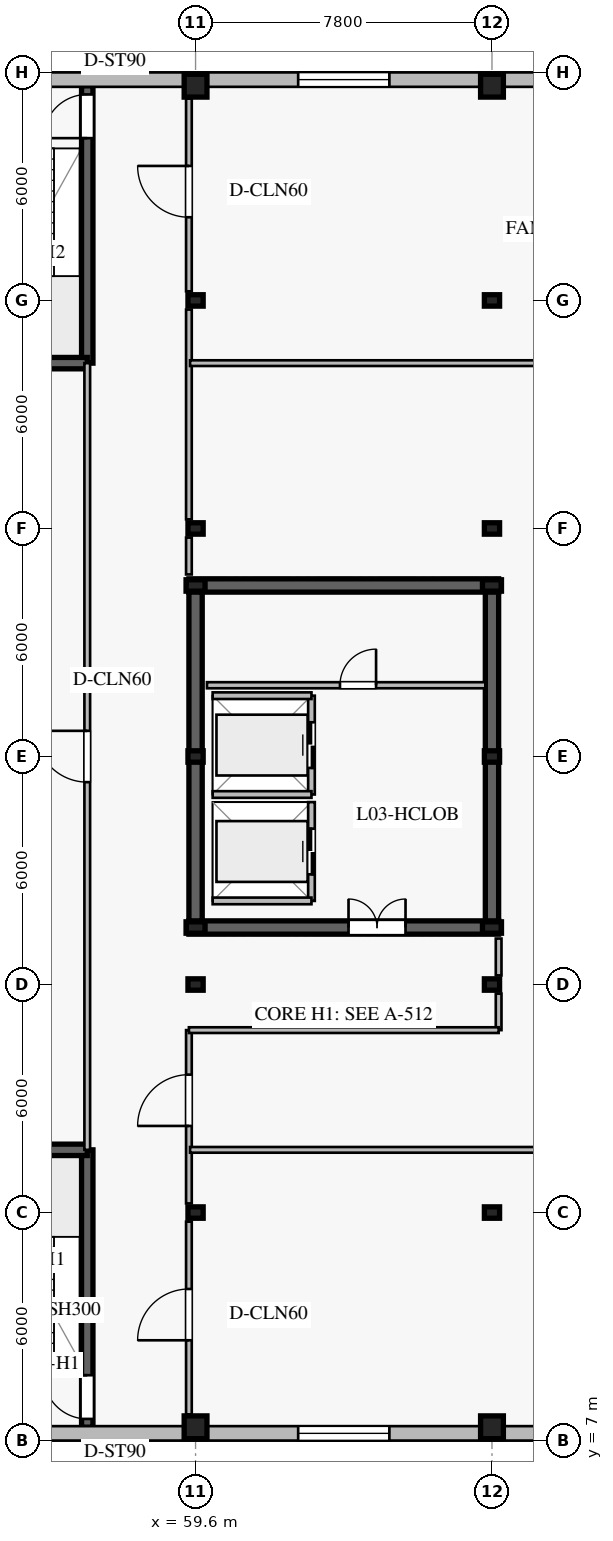
"""IFC4 building model, lengths in metres.
Left out: names, types, materials, properties, quantities, classifications, styles, units other than length and angle.
Written with IfcOpenShell. Run it as: python <this file> out.ifc"""

import sys

from ifc_helpers import new_model, si_unit, direction, frame, frame_2d, origin, origin_2d, place, context, subcontext, project, spatial, rectangle, i_section, extrude, element, fill, save


model = new_model("IFC4")
c1 = context("Model", 3, precision=1e-05, world=origin(), true_north=direction((0.0, 1.0)))
c2 = subcontext(c1, "Body", "Model", "MODEL_VIEW")
j1 = project(units=[si_unit("LENGTHUNIT", "METRE"), si_unit("PLANEANGLEUNIT", "RADIAN")], contexts=[c1])
p1 = place(None, origin())
s1 = spatial("IfcSite", under=j1, at=p1, CompositionType="ELEMENT")
p2 = place(p1, origin())
s2 = spatial("IfcBuilding", under=s1, at=p2, CompositionType="ELEMENT")
p3 = place(p2, frame((0.0, 0.0, 14.4)))
s3 = spatial("IfcBuildingStorey", under=s2, at=p3, CompositionType="ELEMENT", Elevation=14.4)
p4 = place(p3, frame((59.425, 20.5, 0.0), z_axis=(0.0, 0.0, 1.0), x_axis=(1.0, 0.0, 0.0)))
e1 = element("IfcWall", 1, at=p4, inside=s3, PredefinedType="SHEAR", context=c2, shape_type="SweptSolid", body=[
    extrude(rectangle(XDim=8.15, YDim=0.35, at=frame_2d((4.075, 0.0))), origin(), (0.0, 0.0, 1.0), 4.3),
])
p5 = place(p4, frame((4.2, 0.0, 0.0)))
e2 = element("IfcOpeningElement", 2, at=p5, cuts=e1, PredefinedType="OPENING", context=c2, shape_type="SweptSolid", body=[
    extrude(rectangle(XDim=1.5, YDim=2.2, at=frame_2d((0.75, 1.1))), frame((0.0, 0.185, 0.0), z_axis=(0.0, -1.0, 0.0), x_axis=(1.0, 0.0, 0.0)), (0.0, 0.0, 1.0), 0.37),
])
p6 = place(p3, frame((67.575, 29.5, 0.0), z_axis=(0.0, 0.0, 1.0), x_axis=(-1.0, 0.0, 0.0)))
e3 = element("IfcWall", 3, at=p6, inside=s3, PredefinedType="SHEAR", context=c2, shape_type="SweptSolid", body=[
    extrude(rectangle(XDim=8.15, YDim=0.35, at=frame_2d((4.075, 0.0))), origin(), (0.0, 0.0, 1.0), 4.3),
])
for number, where, z_axis, x_axis in (
    (4, (59.6, 29.325, 0.0), (0.0, 0.0, 1.0), (0.0, -1.0, 0.0)),
    (5, (67.4, 20.675, 0.0), (0.0, 0.0, 1.0), (0.0, 1.0, 0.0)),
):
    element("IfcWall", number, at=place(p3, frame(where, z_axis=z_axis, x_axis=x_axis)), inside=s3, PredefinedType="SHEAR", context=c2, shape_type="SweptSolid", body=[
        extrude(rectangle(XDim=8.65, YDim=0.35, at=frame_2d((4.325, 0.0))), origin(), (0.0, 0.0, 1.0), 4.3),
    ])
for number, where, z_axis, x_axis in (
    (6, (59.6, 20.5, 0.0), (0.0, 0.0, 1.0), (1.0, 0.0, 0.0)),
    (7, (67.4, 20.5, 0.0), (0.0, 0.0, 1.0), (1.0, 0.0, 0.0)),
    (8, (67.4, 29.5, 0.0), (0.0, 0.0, 1.0), (1.0, 0.0, 0.0)),
    (9, (59.6, 29.5, 0.0), (0.0, 0.0, 1.0), (1.0, 0.0, 0.0)),
):
    element("IfcColumn", number, at=place(p3, frame(where, z_axis=z_axis, x_axis=x_axis)), inside=s3, PredefinedType="COLUMN", context=c2, shape_type="SweptSolid", body=[
        extrude(i_section(OverallWidth=0.3, OverallDepth=0.5, WebThickness=0.014, FlangeThickness=0.028, at=origin_2d()), origin(), (0.0, 0.0, 1.0), 4.6),
    ])
p7 = place(p3, frame((56.75, 7.35, 0.0), z_axis=(0.0, 0.0, 1.0), x_axis=(0.0, 1.0, 0.0)))
e10 = element("IfcWall", 10, at=p7, inside=s3, PredefinedType="SOLIDWALL", context=c2, shape_type="SweptSolid", body=[
    extrude(rectangle(XDim=7.3, YDim=0.3, at=frame_2d((3.65, 0.0))), origin(), (0.0, 0.0, 1.0), 4.3),
])
p8 = place(p7, frame((0.22, 0.0, 0.0)))
e11 = element("IfcOpeningElement", 11, at=p8, cuts=e10, PredefinedType="OPENING", context=c2, shape_type="SweptSolid", body=[
    extrude(rectangle(XDim=1.15, YDim=2.2, at=frame_2d((0.575, 1.1))), frame((0.0, 0.16, 0.0), z_axis=(0.0, -1.0, 0.0), x_axis=(1.0, 0.0, 0.0)), (0.0, 0.0, 1.0), 0.32),
])
p9 = place(p3, frame((53.4, 14.65, 0.0), z_axis=(0.0, 0.0, 1.0), x_axis=(1.0, 0.0, 0.0)))
e12 = element("IfcWall", 12, at=p9, inside=s3, PredefinedType="SOLIDWALL", context=c2, shape_type="SweptSolid", body=[
    extrude(rectangle(XDim=3.35, YDim=0.3, at=frame_2d((1.675, 0.0))), origin(), (0.0, 0.0, 1.0), 4.3),
])
p10 = place(p3, frame((56.75, 35.35, 0.0), z_axis=(0.0, 0.0, 1.0), x_axis=(0.0, 1.0, 0.0)))
e13 = element("IfcWall", 13, at=p10, inside=s3, PredefinedType="SOLIDWALL", context=c2, shape_type="SweptSolid", body=[
    extrude(rectangle(XDim=7.3, YDim=0.3, at=frame_2d((3.65, 0.0))), origin(), (0.0, 0.0, 1.0), 4.3),
])
p11 = place(p10, frame((5.92, 0.0, 0.0)))
e14 = element("IfcOpeningElement", 14, at=p11, cuts=e13, PredefinedType="OPENING", context=c2, shape_type="SweptSolid", body=[
    extrude(rectangle(XDim=1.15, YDim=2.2, at=frame_2d((0.575, 1.1))), frame((0.0, 0.16, 0.0), z_axis=(0.0, -1.0, 0.0), x_axis=(1.0, 0.0, 0.0)), (0.0, 0.0, 1.0), 0.32),
])
p12 = place(p3, frame((53.4, 35.35, 0.0), z_axis=(0.0, 0.0, 1.0), x_axis=(1.0, 0.0, 0.0)))
e15 = element("IfcWall", 15, at=p12, inside=s3, PredefinedType="SOLIDWALL", context=c2, shape_type="SweptSolid", body=[
    extrude(rectangle(XDim=3.35, YDim=0.3, at=frame_2d((1.675, 0.0))), origin(), (0.0, 0.0, 1.0), 4.3),
])
p13 = place(p3, frame((59.6, 7.35, 0.0), z_axis=(0.0, 0.0, 1.0), x_axis=(1.0, 0.0, 0.0)))
e16 = element("IfcColumn", 16, at=p13, inside=s3, PredefinedType="COLUMN", context=c2, shape_type="SweptSolid", body=[
    extrude(rectangle(XDim=0.6, YDim=0.6, at=origin_2d()), origin(), (0.0, 0.0, 1.0), 4.6),
])
for number, where, z_axis, x_axis in (
    (17, (59.6, 13.0, 0.0), (0.0, 0.0, 1.0), (1.0, 0.0, 0.0)),
    (18, (59.6, 19.0, 0.0), (0.0, 0.0, 1.0), (1.0, 0.0, 0.0)),
    (19, (59.6, 25.0, 0.0), (0.0, 0.0, 1.0), (1.0, 0.0, 0.0)),
    (20, (59.6, 31.0, 0.0), (0.0, 0.0, 1.0), (1.0, 0.0, 0.0)),
    (21, (59.6, 37.0, 0.0), (0.0, 0.0, 1.0), (1.0, 0.0, 0.0)),
):
    element("IfcColumn", number, at=place(p3, frame(where, z_axis=z_axis, x_axis=x_axis)), inside=s3, PredefinedType="COLUMN", context=c2, shape_type="SweptSolid", body=[
        extrude(i_section(OverallWidth=0.3, OverallDepth=0.4, WebThickness=0.013, FlangeThickness=0.024, at=origin_2d()), origin(), (0.0, 0.0, 1.0), 4.6),
    ])
for number, where, z_axis, x_axis in (
    (22, (59.6, 42.65, 0.0), (0.0, 0.0, 1.0), (1.0, 0.0, 0.0)),
    (23, (67.4, 7.35, 0.0), (0.0, 0.0, 1.0), (1.0, 0.0, 0.0)),
):
    element("IfcColumn", number, at=place(p3, frame(where, z_axis=z_axis, x_axis=x_axis)), inside=s3, PredefinedType="COLUMN", context=c2, shape_type="SweptSolid", body=[
        extrude(rectangle(XDim=0.6, YDim=0.6, at=origin_2d()), origin(), (0.0, 0.0, 1.0), 4.6),
    ])
for number, where, z_axis, x_axis in (
    (24, (67.4, 13.0, 0.0), (0.0, 0.0, 1.0), (1.0, 0.0, 0.0)),
    (25, (67.4, 19.0, 0.0), (0.0, 0.0, 1.0), (1.0, 0.0, 0.0)),
    (26, (67.4, 25.0, 0.0), (0.0, 0.0, 1.0), (1.0, 0.0, 0.0)),
    (27, (67.4, 31.0, 0.0), (0.0, 0.0, 1.0), (1.0, 0.0, 0.0)),
    (28, (67.4, 37.0, 0.0), (0.0, 0.0, 1.0), (1.0, 0.0, 0.0)),
):
    element("IfcColumn", number, at=place(p3, frame(where, z_axis=z_axis, x_axis=x_axis)), inside=s3, PredefinedType="COLUMN", context=c2, shape_type="SweptSolid", body=[
        extrude(i_section(OverallWidth=0.3, OverallDepth=0.4, WebThickness=0.013, FlangeThickness=0.024, at=origin_2d()), origin(), (0.0, 0.0, 1.0), 4.6),
    ])
p14 = place(p3, frame((67.4, 42.65, 0.0), z_axis=(0.0, 0.0, 1.0), x_axis=(1.0, 0.0, 0.0)))
e29 = element("IfcColumn", 29, at=p14, inside=s3, PredefinedType="COLUMN", context=c2, shape_type="SweptSolid", body=[
    extrude(rectangle(XDim=0.6, YDim=0.6, at=origin_2d()), origin(), (0.0, 0.0, 1.0), 4.6),
])
p15 = place(p3, frame((75.0, 7.19, 0.0), z_axis=(0.0, 0.0, 1.0), x_axis=(-1.0, 0.0, 0.0)))
e30 = element("IfcWall", 30, at=p15, inside=s3, PredefinedType="STANDARD", context=c2, shape_type="SweptSolid", body=[
    extrude(rectangle(XDim=23.0, YDim=0.38, at=frame_2d((11.5, 0.0))), origin(), (0.0, 0.0, 1.0), 4.3),
])
p16 = place(p15, frame((10.3, 0.0, 0.95)))
e31 = element("IfcOpeningElement", 31, at=p16, cuts=e30, PredefinedType="OPENING", context=c2, shape_type="SweptSolid", body=[
    extrude(rectangle(XDim=2.4, YDim=1.8, at=frame_2d((1.2, 0.9))), frame((0.0, 0.2, 0.0), z_axis=(0.0, -1.0, 0.0), x_axis=(1.0, 0.0, 0.0)), (0.0, 0.0, 1.0), 0.4),
])
p17 = place(p3, frame((52.0, 42.81, 0.0), z_axis=(0.0, 0.0, 1.0), x_axis=(1.0, 0.0, 0.0)))
e32 = element("IfcWall", 32, at=p17, inside=s3, PredefinedType="STANDARD", context=c2, shape_type="SweptSolid", body=[
    extrude(rectangle(XDim=23.0, YDim=0.38, at=frame_2d((11.5, 0.0))), origin(), (0.0, 0.0, 1.0), 4.3),
])
p18 = place(p17, frame((10.3, 0.0, 0.95)))
e33 = element("IfcOpeningElement", 33, at=p18, cuts=e32, PredefinedType="OPENING", context=c2, shape_type="SweptSolid", body=[
    extrude(rectangle(XDim=2.4, YDim=1.8, at=frame_2d((1.2, 0.9))), frame((0.0, 0.2, 0.0), z_axis=(0.0, -1.0, 0.0), x_axis=(1.0, 0.0, 0.0)), (0.0, 0.0, 1.0), 0.4),
])
p19 = place(p3, frame((62.65, 21.2, 0.0), z_axis=(0.0, 0.0, 1.0), x_axis=(0.0, 1.0, 0.0)))
e34 = element("IfcWall", 34, at=p19, inside=s3, PredefinedType="PARTITIONING", context=c2, shape_type="SweptSolid", body=[
    extrude(rectangle(XDim=2.6, YDim=0.175, at=frame_2d((1.3, 0.0))), origin(), (0.0, 0.0, 1.0), 4.3),
])
p20 = place(p19, frame((0.7, 0.0, 0.0)))
e35 = element("IfcOpeningElement", 35, at=p20, cuts=e34, PredefinedType="OPENING", context=c2, shape_type="SweptSolid", body=[
    extrude(rectangle(XDim=1.2, YDim=2.2, at=frame_2d((0.6, 1.1))), frame((0.0, 0.098, 0.0), z_axis=(0.0, -1.0, 0.0), x_axis=(1.0, 0.0, 0.0)), (0.0, 0.0, 1.0), 0.195),
])
p21 = place(p3, frame((60.05, 21.2, 0.0), z_axis=(0.0, 0.0, 1.0), x_axis=(1.0, 0.0, 0.0)))
e36 = element("IfcWall", 36, at=p21, inside=s3, PredefinedType="PARTITIONING", context=c2, shape_type="SweptSolid", body=[
    extrude(rectangle(XDim=2.6, YDim=0.175, at=frame_2d((1.3, 0.0))), origin(), (0.0, 0.0, 1.0), 4.3),
])
p22 = place(p3, frame((62.65, 24.0, 0.0), z_axis=(0.0, 0.0, 1.0), x_axis=(0.0, 1.0, 0.0)))
e37 = element("IfcWall", 37, at=p22, inside=s3, PredefinedType="PARTITIONING", context=c2, shape_type="SweptSolid", body=[
    extrude(rectangle(XDim=2.6, YDim=0.175, at=frame_2d((1.3, 0.0))), origin(), (0.0, 0.0, 1.0), 3.94),
])
p23 = place(p22, frame((0.7, 0.0, 0.0)))
e38 = element("IfcOpeningElement", 38, at=p23, cuts=e37, PredefinedType="OPENING", context=c2, shape_type="SweptSolid", body=[
    extrude(rectangle(XDim=1.2, YDim=2.2, at=frame_2d((0.6, 1.1))), frame((0.0, 0.098, 0.0), z_axis=(0.0, -1.0, 0.0), x_axis=(1.0, 0.0, 0.0)), (0.0, 0.0, 1.0), 0.195),
])
for number, where, z_axis, x_axis in (
    (39, (60.05, 24.0, 0.0), (0.0, 0.0, 1.0), (1.0, 0.0, 0.0)),
    (40, (60.05, 26.6, 0.0), (0.0, 0.0, 1.0), (1.0, 0.0, 0.0)),
):
    element("IfcWall", number, at=place(p3, frame(where, z_axis=z_axis, x_axis=x_axis)), inside=s3, PredefinedType="PARTITIONING", context=c2, shape_type="SweptSolid", body=[
        extrude(rectangle(XDim=2.6, YDim=0.175, at=frame_2d((1.3, 0.0))), origin(), (0.0, 0.0, 1.0), 4.3),
    ])
p24 = place(p3, frame((59.9, 26.875, 0.0), z_axis=(0.0, 0.0, 1.0), x_axis=(1.0, 0.0, 0.0)))
e41 = element("IfcWall", 41, at=p24, inside=s3, PredefinedType="PLUMBINGWALL", context=c2, shape_type="SweptSolid", body=[
    extrude(rectangle(XDim=7.325, YDim=0.16, at=frame_2d((3.663, 0.0))), origin(), (0.0, 0.0, 1.0), 3.94),
])
p25 = place(p24, frame((3.5, 0.0, 0.0)))
e42 = element("IfcOpeningElement", 42, at=p25, cuts=e41, PredefinedType="OPENING", context=c2, shape_type="SweptSolid", body=[
    extrude(rectangle(XDim=0.95, YDim=2.1, at=frame_2d((0.475, 1.05))), frame((0.0, 0.09, 0.0), z_axis=(0.0, -1.0, 0.0), x_axis=(1.0, 0.0, 0.0)), (0.0, 0.0, 1.0), 0.18),
])
p26 = place(p3, frame((56.75, 14.65, 0.0), z_axis=(0.0, 0.0, 1.0), x_axis=(0.0, 1.0, 0.0)))
e43 = element("IfcWall", 43, at=p26, inside=s3, PredefinedType="PARTITIONING", context=c2, shape_type="SweptSolid", body=[
    extrude(rectangle(XDim=20.7, YDim=0.15, at=frame_2d((10.35, 0.0))), origin(), (0.0, 0.0, 1.0), 4.3),
])
p27 = place(p26, frame((9.675, 0.0, 0.0)))
e44 = element("IfcOpeningElement", 44, at=p27, cuts=e43, PredefinedType="OPENING", context=c2, shape_type="SweptSolid", body=[
    extrude(rectangle(XDim=1.35, YDim=2.2, at=frame_2d((0.675, 1.1))), frame((0.0, 0.085, 0.0), z_axis=(0.0, -1.0, 0.0), x_axis=(1.0, 0.0, 0.0)), (0.0, 0.0, 1.0), 0.17),
])
p28 = place(p3, frame((59.425, 7.69, 0.0), z_axis=(0.0, 0.0, 1.0), x_axis=(0.0, 1.0, 0.0)))
e45 = element("IfcWall", 45, at=p28, inside=s3, PredefinedType="PARTITIONING", context=c2, shape_type="SweptSolid", body=[
    extrude(rectangle(XDim=5.07, YDim=0.15, at=frame_2d((2.535, 0.0))), origin(), (0.0, 0.0, 1.0), 3.94),
])
p29 = place(p28, frame((1.949, 0.0, 0.0)))
e46 = element("IfcOpeningElement", 46, at=p29, cuts=e45, PredefinedType="OPENING", context=c2, shape_type="SweptSolid", body=[
    extrude(rectangle(XDim=1.35, YDim=2.2, at=frame_2d((0.675, 1.1))), frame((0.0, 0.085, 0.0), z_axis=(0.0, -1.0, 0.0), x_axis=(1.0, 0.0, 0.0)), (0.0, 0.0, 1.0), 0.17),
])
p30 = place(p3, frame((59.425, 13.24, 0.0), z_axis=(0.0, 0.0, 1.0), x_axis=(0.0, 1.0, 0.0)))
e47 = element("IfcWall", 47, at=p30, inside=s3, PredefinedType="PARTITIONING", context=c2, shape_type="SweptSolid", body=[
    extrude(rectangle(XDim=4.56, YDim=0.15, at=frame_2d((2.28, 0.0))), origin(), (0.0, 0.0, 1.0), 3.94),
])
p31 = place(p30, frame((2.039, 0.0, 0.0)))
e48 = element("IfcOpeningElement", 48, at=p31, cuts=e47, PredefinedType="OPENING", context=c2, shape_type="SweptSolid", body=[
    extrude(rectangle(XDim=1.35, YDim=2.2, at=frame_2d((0.675, 1.1))), frame((0.0, 0.085, 0.0), z_axis=(0.0, -1.0, 0.0), x_axis=(1.0, 0.0, 0.0)), (0.0, 0.0, 1.0), 0.17),
])
p32 = place(p3, frame((59.425, 29.79, 0.0), z_axis=(0.0, 0.0, 1.0), x_axis=(0.0, 1.0, 0.0)))
e49 = element("IfcWall", 49, at=p32, inside=s3, PredefinedType="PARTITIONING", context=c2, shape_type="SweptSolid", body=[
    extrude(rectangle(XDim=0.97, YDim=0.15, at=frame_2d((0.485, 0.0))), origin(), (0.0, 0.0, 1.0), 3.94),
])
p33 = place(p3, frame((59.425, 31.24, 0.0), z_axis=(0.0, 0.0, 1.0), x_axis=(0.0, 1.0, 0.0)))
e50 = element("IfcWall", 50, at=p33, inside=s3, PredefinedType="PARTITIONING", context=c2, shape_type="SweptSolid", body=[
    extrude(rectangle(XDim=5.52, YDim=0.15, at=frame_2d((2.76, 0.0))), origin(), (0.0, 0.0, 1.0), 3.94),
])
p34 = place(p3, frame((59.425, 37.24, 0.0), z_axis=(0.0, 0.0, 1.0), x_axis=(0.0, 1.0, 0.0)))
e51 = element("IfcWall", 51, at=p34, inside=s3, PredefinedType="PARTITIONING", context=c2, shape_type="SweptSolid", body=[
    extrude(rectangle(XDim=5.07, YDim=0.15, at=frame_2d((2.535, 0.0))), origin(), (0.0, 0.0, 1.0), 3.94),
])
p35 = place(p34, frame((1.949, 0.0, 0.0)))
e52 = element("IfcOpeningElement", 52, at=p35, cuts=e51, PredefinedType="OPENING", context=c2, shape_type="SweptSolid", body=[
    extrude(rectangle(XDim=1.35, YDim=2.2, at=frame_2d((0.675, 1.1))), frame((0.0, 0.085, 0.0), z_axis=(0.0, -1.0, 0.0), x_axis=(1.0, 0.0, 0.0)), (0.0, 0.0, 1.0), 0.17),
])
p36 = place(p3, frame((67.575, 17.8, 0.0), z_axis=(0.0, 0.0, 1.0), x_axis=(0.0, 1.0, 0.0)))
e53 = element("IfcWall", 53, at=p36, inside=s3, PredefinedType="PARTITIONING", context=c2, shape_type="SweptSolid", body=[
    extrude(rectangle(XDim=0.96, YDim=0.15, at=frame_2d((0.48, 0.0))), origin(), (0.0, 0.0, 1.0), 3.94),
])
p37 = place(p3, frame((67.575, 19.24, 0.0), z_axis=(0.0, 0.0, 1.0), x_axis=(0.0, 1.0, 0.0)))
e54 = element("IfcWall", 54, at=p37, inside=s3, PredefinedType="PARTITIONING", context=c2, shape_type="SweptSolid", body=[
    extrude(rectangle(XDim=0.97, YDim=0.15, at=frame_2d((0.485, 0.0))), origin(), (0.0, 0.0, 1.0), 3.94),
])
p38 = place(p3, frame((59.425, 17.8, 0.0), z_axis=(0.0, 0.0, 1.0), x_axis=(1.0, 0.0, 0.0)))
e55 = element("IfcWall", 55, at=p38, inside=s3, PredefinedType="PARTITIONING", context=c2, shape_type="SweptSolid", body=[
    extrude(rectangle(XDim=8.15, YDim=0.15, at=frame_2d((4.075, 0.0))), origin(), (0.0, 0.0, 1.0), 3.94),
])
for number, where, z_axis, x_axis in (
    (56, (59.455, 14.65, 0.0), (0.0, 0.0, 1.0), (1.0, 0.0, 0.0)),
    (57, (59.455, 35.35, 0.0), (0.0, 0.0, 1.0), (1.0, 0.0, 0.0)),
):
    element("IfcWall", number, at=place(p3, frame(where, z_axis=z_axis, x_axis=x_axis)), inside=s3, PredefinedType="PARTITIONING", context=c2, shape_type="SweptSolid", body=[
        extrude(rectangle(XDim=15.165, YDim=0.15, at=frame_2d((7.583, 0.0))), origin(), (0.0, 0.0, 1.0), 3.94),
    ])
p39 = place(p16, origin())
e58 = element("IfcWindow", 58, at=p39, inside=s3, PartitioningType="TRIPLE_PANEL_VERTICAL", PredefinedType="WINDOW", context=c2, shape_type="SweptSolid", body=[
    extrude(rectangle(XDim=2.4, YDim=1.8, at=frame_2d((1.2, 0.9))), frame((0.0, 0.03, 0.0), z_axis=(0.0, -1.0, 0.0), x_axis=(1.0, 0.0, 0.0)), (0.0, 0.0, 1.0), 0.06),
])
fill(e31, e58)
p40 = place(p18, origin())
e59 = element("IfcWindow", 59, at=p40, inside=s3, PartitioningType="TRIPLE_PANEL_VERTICAL", PredefinedType="WINDOW", context=c2, shape_type="SweptSolid", body=[
    extrude(rectangle(XDim=2.4, YDim=1.8, at=frame_2d((1.2, 0.9))), frame((0.0, 0.03, 0.0), z_axis=(0.0, -1.0, 0.0), x_axis=(1.0, 0.0, 0.0)), (0.0, 0.0, 1.0), 0.06),
])
fill(e33, e59)
p41 = place(p20, origin())
e60 = element("IfcDoor", 60, at=p41, inside=s3, OperationType="DOUBLE_DOOR_SLIDING", PredefinedType="DOOR", context=c2, shape_type="SweptSolid", body=[
    extrude(rectangle(XDim=1.2, YDim=2.2, at=frame_2d((0.6, 1.1))), frame((0.0, 0.025, 0.0), z_axis=(0.0, -1.0, 0.0), x_axis=(1.0, 0.0, 0.0)), (0.0, 0.0, 1.0), 0.05),
])
fill(e35, e60)
p42 = place(p23, origin())
e61 = element("IfcDoor", 61, at=p42, inside=s3, OperationType="DOUBLE_DOOR_SLIDING", PredefinedType="DOOR", context=c2, shape_type="SweptSolid", body=[
    extrude(rectangle(XDim=1.2, YDim=2.2, at=frame_2d((0.6, 1.1))), frame((0.0, 0.025, 0.0), z_axis=(0.0, -1.0, 0.0), x_axis=(1.0, 0.0, 0.0)), (0.0, 0.0, 1.0), 0.05),
])
fill(e38, e61)
p43 = place(p8, origin())
e62 = element("IfcDoor", 62, at=p43, inside=s3, OperationType="SINGLE_SWING_RIGHT", PredefinedType="DOOR", context=c2, shape_type="SweptSolid", body=[
    extrude(rectangle(XDim=1.15, YDim=2.2, at=frame_2d((0.575, 1.1))), frame((0.0, 0.025, 0.0), z_axis=(0.0, -1.0, 0.0), x_axis=(1.0, 0.0, 0.0)), (0.0, 0.0, 1.0), 0.05),
])
fill(e11, e62)
p44 = place(p11, origin())
e63 = element("IfcDoor", 63, at=p44, inside=s3, OperationType="SINGLE_SWING_LEFT", PredefinedType="DOOR", context=c2, shape_type="SweptSolid", body=[
    extrude(rectangle(XDim=1.15, YDim=2.2, at=frame_2d((0.575, 1.1))), frame((0.0, 0.025, 0.0), z_axis=(0.0, -1.0, 0.0), x_axis=(1.0, 0.0, 0.0)), (0.0, 0.0, 1.0), 0.05),
])
fill(e14, e63)
p45 = place(p5, origin())
e64 = element("IfcDoor", 64, at=p45, inside=s3, OperationType="DOUBLE_DOOR_SINGLE_SWING", PredefinedType="DOOR", context=c2, shape_type="SweptSolid", body=[
    extrude(rectangle(XDim=1.5, YDim=2.2, at=frame_2d((0.75, 1.1))), frame((0.0, 0.025, 0.0), z_axis=(0.0, -1.0, 0.0), x_axis=(1.0, 0.0, 0.0)), (0.0, 0.0, 1.0), 0.05),
])
fill(e2, e64)
p46 = place(p25, origin())
e65 = element("IfcDoor", 65, at=p46, inside=s3, OperationType="SINGLE_SWING_RIGHT", PredefinedType="DOOR", context=c2, shape_type="SweptSolid", body=[
    extrude(rectangle(XDim=0.95, YDim=2.1, at=frame_2d((0.475, 1.05))), frame((0.0, 0.025, 0.0), z_axis=(0.0, -1.0, 0.0), x_axis=(1.0, 0.0, 0.0)), (0.0, 0.0, 1.0), 0.05),
])
fill(e42, e65)
p47 = place(p27, origin())
e66 = element("IfcDoor", 66, at=p47, inside=s3, OperationType="SINGLE_SWING_RIGHT", PredefinedType="DOOR", context=c2, shape_type="SweptSolid", body=[
    extrude(rectangle(XDim=1.35, YDim=2.2, at=frame_2d((0.675, 1.1))), frame((0.0, 0.025, 0.0), z_axis=(0.0, -1.0, 0.0), x_axis=(1.0, 0.0, 0.0)), (0.0, 0.0, 1.0), 0.05),
])
fill(e44, e66)
p48 = place(p29, origin())
e67 = element("IfcDoor", 67, at=p48, inside=s3, OperationType="SINGLE_SWING_LEFT", PredefinedType="DOOR", context=c2, shape_type="SweptSolid", body=[
    extrude(rectangle(XDim=1.35, YDim=2.2, at=frame_2d((0.675, 1.1))), frame((0.0, 0.025, 0.0), z_axis=(0.0, -1.0, 0.0), x_axis=(1.0, 0.0, 0.0)), (0.0, 0.0, 1.0), 0.05),
])
fill(e46, e67)
p49 = place(p35, origin())
e68 = element("IfcDoor", 68, at=p49, inside=s3, OperationType="SINGLE_SWING_RIGHT", PredefinedType="DOOR", context=c2, shape_type="SweptSolid", body=[
    extrude(rectangle(XDim=1.35, YDim=2.2, at=frame_2d((0.675, 1.1))), frame((0.0, 0.025, 0.0), z_axis=(0.0, -1.0, 0.0), x_axis=(1.0, 0.0, 0.0)), (0.0, 0.0, 1.0), 0.05),
])
fill(e52, e68)
p50 = place(p31, origin())
e69 = element("IfcDoor", 69, at=p50, inside=s3, OperationType="SINGLE_SWING_LEFT", PredefinedType="DOOR", context=c2, shape_type="SweptSolid", body=[
    extrude(rectangle(XDim=1.35, YDim=2.2, at=frame_2d((0.675, 1.1))), frame((0.0, 0.025, 0.0), z_axis=(0.0, -1.0, 0.0), x_axis=(1.0, 0.0, 0.0)), (0.0, 0.0, 1.0), 0.05),
])
fill(e48, e69)
save(model, sys.argv[1])
